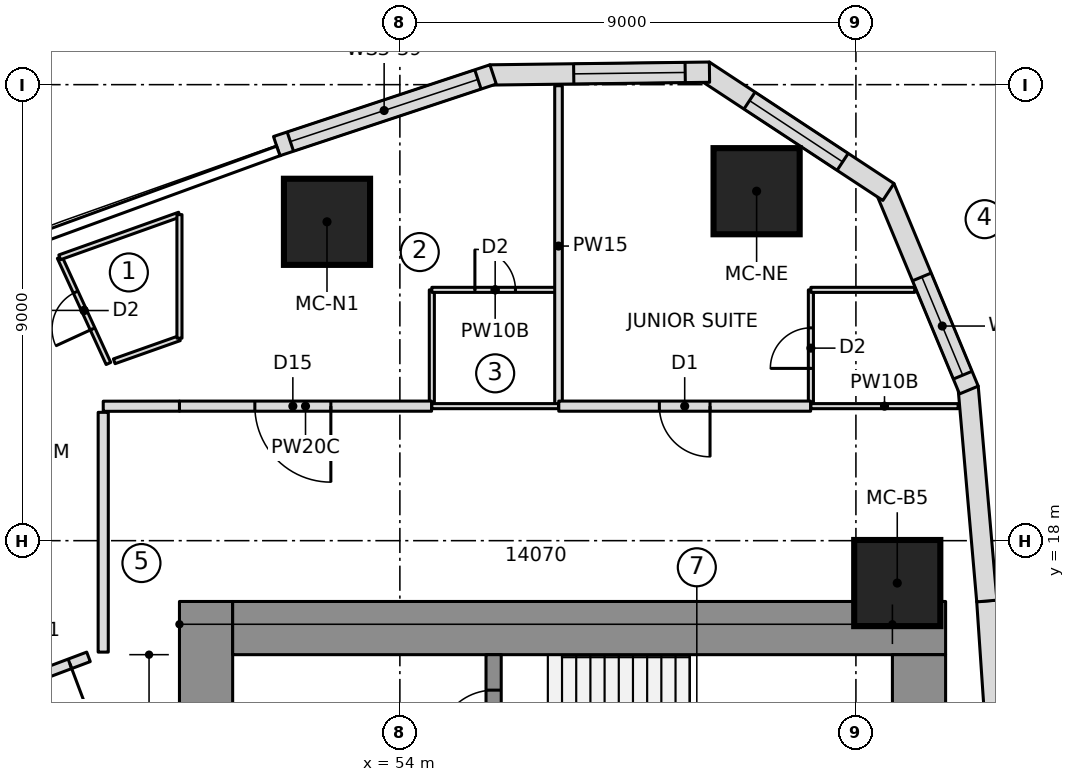
"""IFC4 building model, lengths in metres.
Left out: names, types, materials, properties, quantities, classifications, styles, units other than length and angle.
Written with IfcOpenShell. Run it as: python <this file> out.ifc"""

import sys

from ifc_helpers import new_model, si_unit, direction, frame, frame_2d, origin, origin_2d, place, context, subcontext, project, spatial, polyline, rectangle, outline, extrude, element, fill, save


model = new_model("IFC4")
c1 = context("Model", 3, precision=1e-05, world=origin(), true_north=direction((0.0, 1.0)))
c2 = subcontext(c1, "Body", "Model", "MODEL_VIEW")
j1 = project(units=[si_unit("LENGTHUNIT", "METRE"), si_unit("PLANEANGLEUNIT", "RADIAN")], contexts=[c1])
p1 = place(None, origin())
s1 = spatial("IfcSite", under=j1, at=p1, CompositionType="ELEMENT")
p2 = place(p1, origin())
s2 = spatial("IfcBuilding", under=s1, at=p2, CompositionType="ELEMENT")
p3 = place(p2, frame((0.0, 0.0, 116.85)))
s3 = spatial("IfcBuildingStorey", under=s2, at=p3, CompositionType="ELEMENT", Elevation=116.85)
p4 = place(p3, frame((50.175, 6.65, 0.0), z_axis=(0.0, 0.0, 1.0), x_axis=(0.0, 1.0, 0.0)))
e1 = element("IfcWall", 1, at=p4, inside=s3, PredefinedType="SHEAR", context=c2, shape_type="SweptSolid", body=[
    extrude(rectangle(XDim=10.15, YDim=1.05, at=frame_2d((5.075, 0.0))), origin(), (0.0, 0.0, 1.0), 3.55),
])
p5 = place(p4, frame((6.5, 0.0, 0.0)))
e2 = element("IfcOpeningElement", 2, at=p5, cuts=e1, PredefinedType="OPENING", context=c2, shape_type="SweptSolid", body=[
    extrude(rectangle(XDim=1.1, YDim=2.1, at=frame_2d((0.55, 1.05))), frame((0.0, 0.535, 0.0), z_axis=(0.0, -1.0, 0.0), x_axis=(1.0, 0.0, 0.0)), (0.0, 0.0, 1.0), 1.07),
])
p6 = place(p3, frame((50.7, 16.275, 0.0), z_axis=(0.0, 0.0, 1.0), x_axis=(1.0, 0.0, 0.0)))
e3 = element("IfcWall", 3, at=p6, inside=s3, PredefinedType="SHEAR", context=c2, shape_type="SweptSolid", body=[
    extrude(rectangle(XDim=14.07, YDim=1.05, at=frame_2d((7.035, 0.0))), origin(), (0.0, 0.0, 1.0), 3.55),
])
p7 = place(p3, frame((64.245, 9.389, 0.0), z_axis=(0.0, 0.0, 1.0), x_axis=(0.0, 1.0, 0.0)))
e4 = element("IfcWall", 4, at=p7, inside=s3, PredefinedType="SHEAR", context=c2, shape_type="SweptSolid", body=[
    extrude(rectangle(XDim=6.361, YDim=1.05, at=frame_2d((3.181, 0.0))), origin(), (0.0, 0.0, 1.0), 3.55),
])
p8 = place(p3, frame((55.85, 10.35, 0.0), z_axis=(0.0, 0.0, 1.0), x_axis=(0.0, 1.0, 0.0)))
e5 = element("IfcWall", 5, at=p8, inside=s3, PredefinedType="SHEAR", context=c2, shape_type="SweptSolid", body=[
    extrude(rectangle(XDim=5.4, YDim=0.3, at=frame_2d((2.7, 0.0))), origin(), (0.0, 0.0, 1.0), 3.55),
])
p9 = place(p8, frame((1.43, 0.0, 0.0)))
e6 = element("IfcOpeningElement", 6, at=p9, cuts=e5, PredefinedType="OPENING", context=c2, shape_type="SweptSolid", body=[
    extrude(rectangle(XDim=1.1, YDim=2.1, at=frame_2d((0.55, 1.05))), frame((0.0, 0.16, 0.0), z_axis=(0.0, -1.0, 0.0), x_axis=(1.0, 0.0, 0.0)), (0.0, 0.0, 1.0), 0.32),
])
p10 = place(p8, frame((3.6, 0.0, 0.0)))
e7 = element("IfcOpeningElement", 7, at=p10, cuts=e5, PredefinedType="OPENING", context=c2, shape_type="SweptSolid", body=[
    extrude(rectangle(XDim=1.1, YDim=2.1, at=frame_2d((0.55, 1.05))), frame((0.0, 0.16, 0.0), z_axis=(0.0, -1.0, 0.0), x_axis=(1.0, 0.0, 0.0)), (0.0, 0.0, 1.0), 0.32),
])
for number, where, z_axis, x_axis in (
    (8, (63.816, 17.164, 0.0), (0.0, 0.0, 1.0), (1.0, 0.0, 0.0)),
    (9, (61.04, 24.897, 0.0), (0.0, 0.0, 1.0), (1.0, 0.0, 0.0)),
    (10, (52.562, 24.293, 0.0), (0.0, 0.0, 1.0), (1.0, 0.0, 0.0)),
):
    element("IfcColumn", number, at=place(p3, frame(where, z_axis=z_axis, x_axis=x_axis)), inside=s3, PredefinedType="COLUMN", context=c2, shape_type="SweptSolid", body=[
        extrude(rectangle(XDim=1.7, YDim=1.7, at=origin_2d()), origin(), (0.0, 0.0, 1.0), 3.55),
    ])
p11 = place(p3, frame((65.868, 12.614, 0.0), z_axis=(0.0, 0.0, 1.0), x_axis=(-0.067724559895, 0.997704056315, 0.0)))
e11 = element("IfcWall", 11, at=p11, inside=s3, PredefinedType="NOTDEFINED", context=c2, shape_type="SweptSolid", body=[
    extrude(outline(polyline([(-0.002, -0.2), (4.209, -0.2), (4.205, 0.2), (0.002, 0.2), (-0.002, -0.2)])), origin(), (0.0, 0.0, 1.0), 3.25),
])
p12 = place(p3, frame((65.583, 16.811, 0.0), z_axis=(0.0, 0.0, 1.0), x_axis=(-0.086992730434, 0.996208946382, 0.0)))
e12 = element("IfcWall", 12, at=p12, inside=s3, PredefinedType="NOTDEFINED", context=c2, shape_type="SweptSolid", body=[
    extrude(outline(polyline([(-0.002, -0.2), (4.238, -0.2), (4.176, 0.2), (0.002, 0.2), (-0.002, -0.2)])), origin(), (0.0, 0.0, 1.0), 3.25),
])
p13 = place(p3, frame((65.217, 21.002, 0.0), z_axis=(0.0, 0.0, 1.0), x_axis=(-0.383997751971, 0.923334027577, 0.0)))
e13 = element("IfcWall", 13, at=p13, inside=s3, PredefinedType="NOTDEFINED", context=c2, shape_type="SweptSolid", body=[
    extrude(outline(polyline([(-0.031, -0.2), (4.3, -0.2), (4.177, 0.2), (0.031, 0.2), (-0.031, -0.2)])), origin(), (0.0, 0.0, 1.0), 3.25),
])
p14 = place(p13, frame((0.287, 0.0, 0.6)))
e14 = element("IfcOpeningElement", 14, at=p14, cuts=e13, PredefinedType="OPENING", context=c2, shape_type="SweptSolid", body=[
    extrude(outline(polyline([(0.0, 1.4), (0.08, 1.802), (0.308, 2.142), (0.648, 2.37), (1.05, 2.45), (1.452, 2.37), (1.792, 2.142), (2.02, 1.802), (2.1, 1.4), (2.1, 1.05), (2.02, 0.648), (1.792, 0.308), (1.452, 0.08), (1.05, 0.0), (0.648, 0.08), (0.308, 0.308), (0.08, 0.648), (0.0, 1.05), (0.0, 1.4)])), frame((0.0, 0.21, 0.0), z_axis=(0.0, -1.0, 0.0), x_axis=(1.0, 0.0, 0.0)), (0.0, 0.0, 1.0), 0.42),
])
p15 = place(p3, frame((63.59, 24.916, 0.0), z_axis=(0.0, 0.0, 1.0), x_axis=(-0.835340523653, 0.549732852887, 0.0)))
e15 = element("IfcWall", 15, at=p15, inside=s3, PredefinedType="NOTDEFINED", context=c2, shape_type="SweptSolid", body=[
    extrude(outline(polyline([(-0.061, -0.2), (4.3, -0.2), (4.178, 0.2), (0.061, 0.2), (-0.061, -0.2)])), origin(), (0.0, 0.0, 1.0), 3.25),
])
p16 = place(p15, frame((1.02, 0.0, 0.6)))
e16 = element("IfcOpeningElement", 16, at=p16, cuts=e15, PredefinedType="OPENING", context=c2, shape_type="SweptSolid", body=[
    extrude(outline(polyline([(0.0, 1.35), (0.084, 1.771), (0.322, 2.128), (0.679, 2.366), (1.1, 2.45), (1.521, 2.366), (1.878, 2.128), (2.116, 1.771), (2.2, 1.35), (2.2, 1.1), (2.116, 0.679), (1.878, 0.322), (1.521, 0.084), (1.1, 0.0), (0.679, 0.084), (0.322, 0.322), (0.084, 0.679), (0.0, 1.1), (0.0, 1.35)])), frame((0.0, 0.21, 0.0), z_axis=(0.0, -1.0, 0.0), x_axis=(1.0, 0.0, 0.0)), (0.0, 0.0, 1.0), 0.42),
])
p17 = place(p3, frame((60.049, 27.246, 0.0), z_axis=(0.0, 0.0, 1.0), x_axis=(-0.999919718849, -0.012671063772, 0.0)))
e17 = element("IfcWall", 17, at=p17, inside=s3, PredefinedType="NOTDEFINED", context=c2, shape_type="SweptSolid", body=[
    extrude(outline(polyline([(-0.061, -0.2), (4.27, -0.2), (4.208, 0.2), (0.061, 0.2), (-0.061, -0.2)])), origin(), (0.0, 0.0, 1.0), 3.25),
])
p18 = place(p17, frame((0.418, 0.0, 0.6)))
e18 = element("IfcOpeningElement", 18, at=p18, cuts=e17, PredefinedType="OPENING", context=c2, shape_type="SweptSolid", body=[
    extrude(outline(polyline([(0.0, 1.35), (0.084, 1.771), (0.322, 2.128), (0.679, 2.366), (1.1, 2.45), (1.521, 2.366), (1.878, 2.128), (2.116, 1.771), (2.2, 1.35), (2.2, 1.1), (2.116, 0.679), (1.878, 0.322), (1.521, 0.084), (1.1, 0.0), (0.679, 0.084), (0.322, 0.322), (0.084, 0.679), (0.0, 1.1), (0.0, 1.35)])), frame((0.0, 0.21, 0.0), z_axis=(0.0, -1.0, 0.0), x_axis=(1.0, 0.0, 0.0)), (0.0, 0.0, 1.0), 0.42),
])
p19 = place(p3, frame((55.81, 27.192, 0.0), z_axis=(0.0, 0.0, 1.0), x_axis=(-0.94925004851, -0.314522408429, 0.0)))
e19 = element("IfcWall", 19, at=p19, inside=s3, PredefinedType="NOTDEFINED", context=c2, shape_type="SweptSolid", body=[
    extrude(outline(polyline([(-0.031, -0.2), (4.468, -0.2), (4.468, 0.2), (0.031, 0.2), (-0.031, -0.2)])), origin(), (0.0, 0.0, 1.0), 3.25),
])
p20 = place(p19, frame((0.284, 0.0, 0.9)))
e20 = element("IfcOpeningElement", 20, at=p20, cuts=e19, PredefinedType="OPENING", context=c2, shape_type="SweptSolid", body=[
    extrude(rectangle(XDim=3.9, YDim=1.8, at=frame_2d((1.95, 0.9))), frame((0.0, 0.21, 0.0), z_axis=(0.0, -1.0, 0.0), x_axis=(1.0, 0.0, 0.0)), (0.0, 0.0, 1.0), 0.42),
])
p21 = place(p3, frame((54.631, 20.65, 0.0), z_axis=(0.0, 0.0, 1.0), x_axis=(0.0, 1.0, 0.0)))
e21 = element("IfcWall", 21, at=p21, inside=s3, PredefinedType="PARTITIONING", context=c2, shape_type="SweptSolid", body=[
    extrude(rectangle(XDim=2.3, YDim=0.1, at=frame_2d((1.15, 0.0))), origin(), (0.0, 0.0, 1.0), 3.15),
])
p22 = place(p3, frame((54.631, 22.95, 0.0), z_axis=(0.0, 0.0, 1.0), x_axis=(1.0, 0.0, 0.0)))
e22 = element("IfcWall", 22, at=p22, inside=s3, PredefinedType="PARTITIONING", context=c2, shape_type="SweptSolid", body=[
    extrude(rectangle(XDim=2.5, YDim=0.1, at=frame_2d((1.25, 0.0))), origin(), (0.0, 0.0, 1.0), 3.15),
])
p23 = place(p22, frame((0.85, 0.0, 0.0)))
e23 = element("IfcOpeningElement", 23, at=p23, cuts=e22, PredefinedType="OPENING", context=c2, shape_type="SweptSolid", body=[
    extrude(rectangle(XDim=0.8, YDim=2.1, at=frame_2d((0.4, 1.05))), frame((0.0, 0.06, 0.0), z_axis=(0.0, -1.0, 0.0), x_axis=(1.0, 0.0, 0.0)), (0.0, 0.0, 1.0), 0.12),
])
p24 = place(p3, frame((62.111, 20.65, 0.0), z_axis=(0.0, 0.0, 1.0), x_axis=(0.0, 1.0, 0.0)))
e24 = element("IfcWall", 24, at=p24, inside=s3, PredefinedType="PARTITIONING", context=c2, shape_type="SweptSolid", body=[
    extrude(rectangle(XDim=2.3, YDim=0.1, at=frame_2d((1.15, 0.0))), origin(), (0.0, 0.0, 1.0), 3.15),
])
p25 = place(p24, frame((0.75, 0.0, 0.0)))
e25 = element("IfcOpeningElement", 25, at=p25, cuts=e24, PredefinedType="OPENING", context=c2, shape_type="SweptSolid", body=[
    extrude(rectangle(XDim=0.8, YDim=2.1, at=frame_2d((0.4, 1.05))), frame((0.0, 0.06, 0.0), z_axis=(0.0, -1.0, 0.0), x_axis=(1.0, 0.0, 0.0)), (0.0, 0.0, 1.0), 0.12),
])
p26 = place(p3, frame((62.111, 22.95, 0.0), z_axis=(0.0, 0.0, 1.0), x_axis=(1.0, 0.0, 0.0)))
e26 = element("IfcWall", 26, at=p26, inside=s3, PredefinedType="PARTITIONING", context=c2, shape_type="SweptSolid", body=[
    extrude(rectangle(XDim=2.049, YDim=0.1, at=frame_2d((1.025, 0.0))), origin(), (0.0, 0.0, 1.0), 3.15),
])
p27 = place(p3, frame((57.131, 20.65, 0.0), z_axis=(0.0, 0.0, 1.0), x_axis=(0.0, 1.0, 0.0)))
e27 = element("IfcWall", 27, at=p27, inside=s3, PredefinedType="PARTITIONING", context=c2, shape_type="SweptSolid", body=[
    extrude(rectangle(XDim=6.329, YDim=0.15, at=frame_2d((3.165, 0.0))), origin(), (0.0, 0.0, 1.0), 3.15),
])
p28 = place(p3, frame((48.249, 21.497, 0.0), z_axis=(0.0, 0.0, 1.0), x_axis=(-0.41749308293, 0.908680100864, 0.0)))
e28 = element("IfcWall", 28, at=p28, inside=s3, PredefinedType="PARTITIONING", context=c2, shape_type="SweptSolid", body=[
    extrude(rectangle(XDim=2.306, YDim=0.1, at=frame_2d((1.153, 0.0))), origin(), (0.0, 0.0, 1.0), 3.15),
])
p29 = place(p28, frame((0.75, 0.0, 0.0)))
e29 = element("IfcOpeningElement", 29, at=p29, cuts=e28, PredefinedType="OPENING", context=c2, shape_type="SweptSolid", body=[
    extrude(rectangle(XDim=0.8, YDim=2.1, at=frame_2d((0.4, 1.05))), frame((0.0, 0.06, 0.0), z_axis=(0.0, -1.0, 0.0), x_axis=(1.0, 0.0, 0.0)), (0.0, 0.0, 1.0), 0.12),
])
p30 = place(p3, frame((49.65, 21.996, 0.0), z_axis=(0.0, 0.0, 1.0), x_axis=(-0.942692856107, -0.333661773425, 0.0)))
e30 = element("IfcWall", 30, at=p30, inside=s3, PredefinedType="PARTITIONING", context=c2, shape_type="SweptSolid", body=[
    extrude(rectangle(XDim=1.365, YDim=0.1, at=frame_2d((0.683, 0.0))), origin(), (0.0, 0.0, 1.0), 3.15),
])
p31 = place(p3, frame((54.625, 20.655, 0.0), z_axis=(0.0, 0.0, 1.0), x_axis=(-1.0, 0.0, 0.0)))
e31 = element("IfcWall", 31, at=p31, inside=s3, PredefinedType="PARTITIONING", context=c2, shape_type="SweptSolid", body=[
    extrude(rectangle(XDim=4.976, YDim=0.2, at=frame_2d((2.488, 0.0))), origin(), (0.0, 0.0, 1.0), 3.15),
])
p32 = place(p31, frame((1.988, 0.0, 0.0)))
e32 = element("IfcOpeningElement", 32, at=p32, cuts=e31, PredefinedType="OPENING", context=c2, shape_type="SweptSolid", body=[
    extrude(rectangle(XDim=1.5, YDim=2.1, at=frame_2d((0.75, 1.05))), frame((0.0, 0.11, 0.0), z_axis=(0.0, -1.0, 0.0), x_axis=(1.0, 0.0, 0.0)), (0.0, 0.0, 1.0), 0.22),
])
p33 = place(p3, frame((62.106, 20.655, 0.0), z_axis=(0.0, 0.0, 1.0), x_axis=(-1.0, 0.0, 0.0)))
e33 = element("IfcWall", 33, at=p33, inside=s3, PredefinedType="PARTITIONING", context=c2, shape_type="SweptSolid", body=[
    extrude(rectangle(XDim=4.971, YDim=0.2, at=frame_2d((2.485, 0.0))), origin(), (0.0, 0.0, 1.0), 3.15),
])
p34 = place(p33, frame((1.985, 0.0, 0.0)))
e34 = element("IfcOpeningElement", 34, at=p34, cuts=e33, PredefinedType="OPENING", context=c2, shape_type="SweptSolid", body=[
    extrude(rectangle(XDim=1.0, YDim=2.1, at=frame_2d((0.5, 1.05))), frame((0.0, 0.11, 0.0), z_axis=(0.0, -1.0, 0.0), x_axis=(1.0, 0.0, 0.0)), (0.0, 0.0, 1.0), 0.22),
])
p35 = place(p3, frame((57.131, 20.655, 0.0), z_axis=(0.0, 0.0, 1.0), x_axis=(-1.0, 0.0, 0.0)))
e35 = element("IfcWall", 35, at=p35, inside=s3, PredefinedType="PARTITIONING", context=c2, shape_type="SweptSolid", body=[
    extrude(rectangle(XDim=2.5, YDim=0.1, at=frame_2d((1.25, 0.0))), origin(), (0.0, 0.0, 1.0), 3.15),
])
p36 = place(p3, frame((65.017, 20.655, 0.0), z_axis=(0.0, 0.0, 1.0), x_axis=(-1.0, 0.0, 0.0)))
e36 = element("IfcWall", 36, at=p36, inside=s3, PredefinedType="PARTITIONING", context=c2, shape_type="SweptSolid", body=[
    extrude(rectangle(XDim=2.906, YDim=0.1, at=frame_2d((1.453, 0.0))), origin(), (0.0, 0.0, 1.0), 3.15),
])
p37 = place(p3, frame((47.286, 23.592, 0.0), z_axis=(0.0, 0.0, 1.0), x_axis=(0.941933231826, 0.335800218555, 0.0)))
e37 = element("IfcWall", 37, at=p37, inside=s3, PredefinedType="PARTITIONING", context=c2, shape_type="SweptSolid", body=[
    extrude(rectangle(XDim=2.51, YDim=0.1, at=frame_2d((1.255, 0.0))), origin(), (0.0, 0.0, 1.0), 3.15),
])
p38 = place(p3, frame((49.65, 24.435, 0.0), z_axis=(0.0, 0.0, 1.0), x_axis=(0.0, -1.0, 0.0)))
e38 = element("IfcWall", 38, at=p38, inside=s3, PredefinedType="PARTITIONING", context=c2, shape_type="SweptSolid", body=[
    extrude(rectangle(XDim=2.439, YDim=0.1, at=frame_2d((1.22, 0.0))), origin(), (0.0, 0.0, 1.0), 3.15),
])
p39 = place(p3, frame((47.855, 15.707, 0.0), z_axis=(0.0, 0.0, 1.0), x_axis=(-0.935895556609, -0.352277599513, 0.0)))
e39 = element("IfcWall", 39, at=p39, inside=s3, PredefinedType="PARTITIONING", context=c2, shape_type="SweptSolid", body=[
    extrude(rectangle(XDim=1.785, YDim=0.2, at=frame_2d((0.892, 0.0))), origin(), (0.0, 0.0, 1.0), 3.15),
])
p40 = place(p39, frame((0.392, 0.0, 0.0)))
e40 = element("IfcOpeningElement", 40, at=p40, cuts=e39, PredefinedType="OPENING", context=c2, shape_type="SweptSolid", body=[
    extrude(rectangle(XDim=1.0, YDim=2.1, at=frame_2d((0.5, 1.05))), frame((0.0, 0.11, 0.0), z_axis=(0.0, -1.0, 0.0), x_axis=(1.0, 0.0, 0.0)), (0.0, 0.0, 1.0), 0.22),
])
p41 = place(p3, frame((49.65, 20.655, 0.0), z_axis=(0.0, 0.0, 1.0), x_axis=(-0.999998933031, -0.001460800259, 0.0)))
e41 = element("IfcWall", 41, at=p41, inside=s3, PredefinedType="PARTITIONING", context=c2, shape_type="SweptSolid", body=[
    extrude(rectangle(XDim=1.504, YDim=0.2, at=frame_2d((0.752, 0.0))), origin(), (0.0, 0.0, 1.0), 3.15),
])
p42 = place(p3, frame((48.146, 20.533, 0.0), z_axis=(0.0, 0.0, 1.0), x_axis=(-0.000103183201, -0.999999994677, 0.0)))
e42 = element("IfcWall", 42, at=p42, inside=s3, PredefinedType="PARTITIONING", context=c2, shape_type="SweptSolid", body=[
    extrude(rectangle(XDim=4.732, YDim=0.2, at=frame_2d((2.366, 0.0))), origin(), (0.0, 0.0, 1.0), 3.15),
])
p43 = place(p14, origin())
e43 = element("IfcWindow", 43, at=p43, inside=s3, PartitioningType="SINGLE_PANEL", PredefinedType="WINDOW", context=c2, shape_type="SweptSolid", body=[
    extrude(outline(polyline([(0.0, 1.4), (0.08, 1.802), (0.308, 2.142), (0.648, 2.37), (1.05, 2.45), (1.452, 2.37), (1.792, 2.142), (2.02, 1.802), (2.1, 1.4), (2.1, 1.05), (2.02, 0.648), (1.792, 0.308), (1.452, 0.08), (1.05, 0.0), (0.648, 0.08), (0.308, 0.308), (0.08, 0.648), (0.0, 1.05), (0.0, 1.4)])), frame((0.0, 0.17, 0.0), z_axis=(0.0, -1.0, 0.0), x_axis=(1.0, 0.0, 0.0)), (0.0, 0.0, 1.0), 0.06),
])
fill(e14, e43)
p44 = place(p16, origin())
e44 = element("IfcWindow", 44, at=p44, inside=s3, PartitioningType="SINGLE_PANEL", PredefinedType="WINDOW", context=c2, shape_type="SweptSolid", body=[
    extrude(outline(polyline([(0.0, 1.35), (0.084, 1.771), (0.322, 2.128), (0.679, 2.366), (1.1, 2.45), (1.521, 2.366), (1.878, 2.128), (2.116, 1.771), (2.2, 1.35), (2.2, 1.1), (2.116, 0.679), (1.878, 0.322), (1.521, 0.084), (1.1, 0.0), (0.679, 0.084), (0.322, 0.322), (0.084, 0.679), (0.0, 1.1), (0.0, 1.35)])), frame((0.0, 0.17, 0.0), z_axis=(0.0, -1.0, 0.0), x_axis=(1.0, 0.0, 0.0)), (0.0, 0.0, 1.0), 0.06),
])
fill(e16, e44)
p45 = place(p18, origin())
e45 = element("IfcWindow", 45, at=p45, inside=s3, PartitioningType="SINGLE_PANEL", PredefinedType="WINDOW", context=c2, shape_type="SweptSolid", body=[
    extrude(outline(polyline([(0.0, 1.35), (0.084, 1.771), (0.322, 2.128), (0.679, 2.366), (1.1, 2.45), (1.521, 2.366), (1.878, 2.128), (2.116, 1.771), (2.2, 1.35), (2.2, 1.1), (2.116, 0.679), (1.878, 0.322), (1.521, 0.084), (1.1, 0.0), (0.679, 0.084), (0.322, 0.322), (0.084, 0.679), (0.0, 1.1), (0.0, 1.35)])), frame((0.0, 0.17, 0.0), z_axis=(0.0, -1.0, 0.0), x_axis=(1.0, 0.0, 0.0)), (0.0, 0.0, 1.0), 0.06),
])
fill(e18, e45)
p46 = place(p20, origin())
e46 = element("IfcWindow", 46, at=p46, inside=s3, PartitioningType="SINGLE_PANEL", PredefinedType="WINDOW", context=c2, shape_type="SweptSolid", body=[
    extrude(rectangle(XDim=3.9, YDim=1.8, at=frame_2d((1.95, 0.9))), frame((0.0, 0.17, 0.0), z_axis=(0.0, -1.0, 0.0), x_axis=(1.0, 0.0, 0.0)), (0.0, 0.0, 1.0), 0.06),
])
fill(e20, e46)
p47 = place(p23, origin())
e47 = element("IfcDoor", 47, at=p47, inside=s3, OperationType="SINGLE_SWING_LEFT", PredefinedType="DOOR", context=c2, shape_type="SweptSolid", body=[
    extrude(rectangle(XDim=0.8, YDim=2.1, at=frame_2d((0.4, 1.05))), frame((0.0, 0.025, 0.0), z_axis=(0.0, -1.0, 0.0), x_axis=(1.0, 0.0, 0.0)), (0.0, 0.0, 1.0), 0.05),
])
fill(e23, e47)
p48 = place(p25, origin())
e48 = element("IfcDoor", 48, at=p48, inside=s3, OperationType="SINGLE_SWING_LEFT", PredefinedType="DOOR", context=c2, shape_type="SweptSolid", body=[
    extrude(rectangle(XDim=0.8, YDim=2.1, at=frame_2d((0.4, 1.05))), frame((0.0, 0.025, 0.0), z_axis=(0.0, -1.0, 0.0), x_axis=(1.0, 0.0, 0.0)), (0.0, 0.0, 1.0), 0.05),
])
fill(e25, e48)
p49 = place(p29, origin())
e49 = element("IfcDoor", 49, at=p49, inside=s3, OperationType="SINGLE_SWING_LEFT", PredefinedType="DOOR", context=c2, shape_type="SweptSolid", body=[
    extrude(rectangle(XDim=0.8, YDim=2.1, at=frame_2d((0.4, 1.05))), frame((0.0, 0.025, 0.0), z_axis=(0.0, -1.0, 0.0), x_axis=(1.0, 0.0, 0.0)), (0.0, 0.0, 1.0), 0.05),
])
fill(e29, e49)
p50 = place(p40, origin())
e50 = element("IfcDoor", 50, at=p50, inside=s3, OperationType="SINGLE_SWING_LEFT", PredefinedType="DOOR", context=c2, shape_type="SweptSolid", body=[
    extrude(rectangle(XDim=1.0, YDim=2.1, at=frame_2d((0.5, 1.05))), frame((0.0, 0.025, 0.0), z_axis=(0.0, -1.0, 0.0), x_axis=(1.0, 0.0, 0.0)), (0.0, 0.0, 1.0), 0.05),
])
fill(e40, e50)
p51 = place(p32, origin())
e51 = element("IfcDoor", 51, at=p51, inside=s3, OperationType="DOUBLE_DOOR_SINGLE_SWING", PredefinedType="DOOR", context=c2, shape_type="SweptSolid", body=[
    extrude(rectangle(XDim=1.5, YDim=2.1, at=frame_2d((0.75, 1.05))), frame((0.0, 0.025, 0.0), z_axis=(0.0, -1.0, 0.0), x_axis=(1.0, 0.0, 0.0)), (0.0, 0.0, 1.0), 0.05),
])
fill(e32, e51)
p52 = place(p34, origin())
e52 = element("IfcDoor", 52, at=p52, inside=s3, OperationType="SINGLE_SWING_LEFT", PredefinedType="DOOR", context=c2, shape_type="SweptSolid", body=[
    extrude(rectangle(XDim=1.0, YDim=2.1, at=frame_2d((0.5, 1.05))), frame((0.0, 0.025, 0.0), z_axis=(0.0, -1.0, 0.0), x_axis=(1.0, 0.0, 0.0)), (0.0, 0.0, 1.0), 0.05),
])
fill(e34, e52)
p53 = place(p10, origin())
e53 = element("IfcDoor", 53, at=p53, inside=s3, OperationType="SINGLE_SWING_RIGHT", PredefinedType="DOOR", context=c2, shape_type="SweptSolid", body=[
    extrude(rectangle(XDim=1.1, YDim=2.1, at=frame_2d((0.55, 1.05))), frame((0.0, 0.025, 0.0), z_axis=(0.0, -1.0, 0.0), x_axis=(1.0, 0.0, 0.0)), (0.0, 0.0, 1.0), 0.05),
])
fill(e7, e53)
save(model, sys.argv[1])
